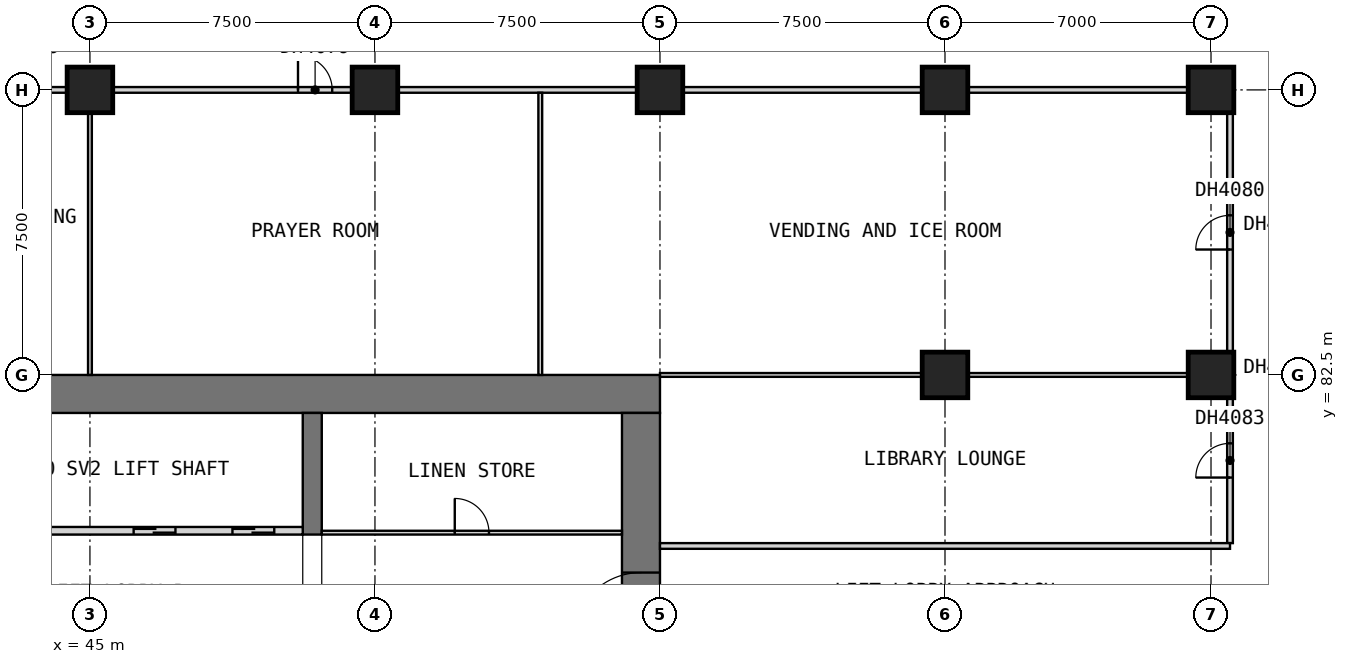
"""IFC4 building model, lengths in metres.
Left out: names, types, materials, properties, quantities, classifications, styles, units other than length and angle.
Written with IfcOpenShell. Run it as: python <this file> out.ifc"""

import sys

from ifc_helpers import new_model, si_unit, direction, frame, frame_2d, origin, origin_2d, place, context, subcontext, project, spatial, rectangle, extrude, element, fill, save


model = new_model("IFC4")
c1 = context("Model", 3, precision=1e-05, world=origin(), true_north=direction((0.0, 1.0)))
c2 = subcontext(c1, "Body", "Model", "MODEL_VIEW")
j1 = project(units=[si_unit("LENGTHUNIT", "METRE"), si_unit("PLANEANGLEUNIT", "RADIAN")], contexts=[c1])
p1 = place(None, origin())
s1 = spatial("IfcSite", under=j1, at=p1, CompositionType="ELEMENT")
p2 = place(p1, origin())
s2 = spatial("IfcBuilding", under=s1, at=p2, CompositionType="ELEMENT")
p3 = place(p2, frame((0.0, 0.0, 44.8)))
s3 = spatial("IfcBuildingStorey", under=s2, at=p3, CompositionType="ELEMENT", Elevation=44.8)
for number, where, z_axis, x_axis in (
    (1, (45.0, 90.0, 0.0), (0.0, 0.0, 1.0), (1.0, 0.0, 0.0)),
    (2, (52.5, 90.0, 0.0), (0.0, 0.0, 1.0), (1.0, 0.0, 0.0)),
    (3, (60.0, 90.0, 0.0), (0.0, 0.0, 1.0), (1.0, 0.0, 0.0)),
    (4, (67.5, 82.5, 0.0), (0.0, 0.0, 1.0), (1.0, 0.0, 0.0)),
    (5, (67.5, 90.0, 0.0), (0.0, 0.0, 1.0), (1.0, 0.0, 0.0)),
    (6, (74.5, 82.5, 0.0), (0.0, 0.0, 1.0), (1.0, 0.0, 0.0)),
    (7, (74.5, 90.0, 0.0), (0.0, 0.0, 1.0), (1.0, 0.0, 0.0)),
):
    element("IfcColumn", number, at=place(p3, frame(where, z_axis=z_axis, x_axis=x_axis)), inside=s3, PredefinedType="COLUMN", context=c2, shape_type="SweptSolid", body=[
        extrude(rectangle(XDim=1.2, YDim=1.2, at=origin_2d()), origin(), (0.0, 0.0, 1.0), 3.6),
    ])
p4 = place(p3, frame((30.0, 82.0, 0.0), z_axis=(0.0, 0.0, 1.0), x_axis=(1.0, 0.0, 0.0)))
e8 = element("IfcWall", 8, at=p4, inside=s3, PredefinedType="SHEAR", context=c2, shape_type="SweptSolid", body=[
    extrude(rectangle(XDim=30.0, YDim=1.0, at=frame_2d((15.0, 0.0))), origin(), (0.0, 0.0, 1.0), 3.6),
])
p5 = place(p3, frame((59.5, 61.0, 0.0), z_axis=(0.0, 0.0, 1.0), x_axis=(0.0, 1.0, 0.0)))
e9 = element("IfcWall", 9, at=p5, inside=s3, PredefinedType="SHEAR", context=c2, shape_type="SweptSolid", body=[
    extrude(rectangle(XDim=20.5, YDim=1.0, at=frame_2d((10.25, 0.0))), origin(), (0.0, 0.0, 1.0), 3.6),
])
p6 = place(p5, frame((14.5, 0.0, 0.0)))
e10 = element("IfcOpeningElement", 10, at=p6, cuts=e9, PredefinedType="OPENING", context=c2, shape_type="SweptSolid", body=[
    extrude(rectangle(XDim=1.8, YDim=2.1, at=frame_2d((0.9, 1.05))), frame((0.0, 0.51, 0.0), z_axis=(0.0, -1.0, 0.0), x_axis=(1.0, 0.0, 0.0)), (0.0, 0.0, 1.0), 1.02),
])
p7 = place(p3, frame((50.85, 78.3, 0.0), z_axis=(0.0, 0.0, 1.0), x_axis=(0.0, 1.0, 0.0)))
e11 = element("IfcWall", 11, at=p7, inside=s3, PredefinedType="SHEAR", context=c2, shape_type="SweptSolid", body=[
    extrude(rectangle(XDim=3.2, YDim=0.5, at=frame_2d((1.6, 0.0))), origin(), (0.0, 0.0, 1.0), 3.6),
])
p8 = place(p3, frame((35.0, 78.4, 0.0), z_axis=(0.0, 0.0, 1.0), x_axis=(1.0, 0.0, 0.0)))
e12 = element("IfcWall", 12, at=p8, inside=s3, PredefinedType="SOLIDWALL", context=c2, shape_type="SweptSolid", body=[
    extrude(rectangle(XDim=15.6, YDim=0.2, at=frame_2d((7.8, 0.0))), origin(), (0.0, 0.0, 1.0), 3.6),
])
p9 = place(p8, frame((0.75, 0.0, 0.0)))
e13 = element("IfcOpeningElement", 13, at=p9, cuts=e12, PredefinedType="OPENING", context=c2, shape_type="SweptSolid", body=[
    extrude(rectangle(XDim=1.1, YDim=2.1, at=frame_2d((0.55, 1.05))), frame((0.0, 0.11, 0.0), z_axis=(0.0, -1.0, 0.0), x_axis=(1.0, 0.0, 0.0)), (0.0, 0.0, 1.0), 0.22),
])
p10 = place(p8, frame((3.35, 0.0, 0.0)))
e14 = element("IfcOpeningElement", 14, at=p10, cuts=e12, PredefinedType="OPENING", context=c2, shape_type="SweptSolid", body=[
    extrude(rectangle(XDim=1.1, YDim=2.1, at=frame_2d((0.55, 1.05))), frame((0.0, 0.11, 0.0), z_axis=(0.0, -1.0, 0.0), x_axis=(1.0, 0.0, 0.0)), (0.0, 0.0, 1.0), 0.22),
])
p11 = place(p8, frame((11.15, 0.0, 0.0)))
e15 = element("IfcOpeningElement", 15, at=p11, cuts=e12, PredefinedType="OPENING", context=c2, shape_type="SweptSolid", body=[
    extrude(rectangle(XDim=1.1, YDim=2.1, at=frame_2d((0.55, 1.05))), frame((0.0, 0.11, 0.0), z_axis=(0.0, -1.0, 0.0), x_axis=(1.0, 0.0, 0.0)), (0.0, 0.0, 1.0), 0.22),
])
p12 = place(p8, frame((13.75, 0.0, 0.0)))
e16 = element("IfcOpeningElement", 16, at=p12, cuts=e12, PredefinedType="OPENING", context=c2, shape_type="SweptSolid", body=[
    extrude(rectangle(XDim=1.1, YDim=2.1, at=frame_2d((0.55, 1.05))), frame((0.0, 0.11, 0.0), z_axis=(0.0, -1.0, 0.0), x_axis=(1.0, 0.0, 0.0)), (0.0, 0.0, 1.0), 0.22),
])
p13 = place(p3, frame((51.1, 78.35, 0.0), z_axis=(0.0, 0.0, 1.0), x_axis=(1.0, 0.0, 0.0)))
e17 = element("IfcWall", 17, at=p13, inside=s3, PredefinedType="PARTITIONING", context=c2, shape_type="SweptSolid", body=[
    extrude(rectangle(XDim=7.9, YDim=0.1, at=frame_2d((3.95, 0.0))), origin(), (0.0, 0.0, 1.0), 3.35),
])
p14 = place(p13, frame((3.5, 0.0, 0.0)))
e18 = element("IfcOpeningElement", 18, at=p14, cuts=e17, PredefinedType="OPENING", context=c2, shape_type="SweptSolid", body=[
    extrude(rectangle(XDim=0.9, YDim=2.1, at=frame_2d((0.45, 1.05))), frame((0.0, 0.06, 0.0), z_axis=(0.0, -1.0, 0.0), x_axis=(1.0, 0.0, 0.0)), (0.0, 0.0, 1.0), 0.12),
])
p15 = place(p3, frame((33.75, 90.0, 0.0), z_axis=(0.0, 0.0, 1.0), x_axis=(1.0, 0.0, 0.0)))
e19 = element("IfcWall", 19, at=p15, inside=s3, PredefinedType="PARTITIONING", context=c2, shape_type="SweptSolid", body=[
    extrude(rectangle(XDim=41.25, YDim=0.15, at=frame_2d((20.625, 0.0))), origin(), (0.0, 0.0, 1.0), 3.35),
])
p16 = place(p15, frame((4.4, 0.0, 0.0)))
e20 = element("IfcOpeningElement", 20, at=p16, cuts=e19, PredefinedType="OPENING", context=c2, shape_type="SweptSolid", body=[
    extrude(rectangle(XDim=0.9, YDim=2.1, at=frame_2d((0.45, 1.05))), frame((0.0, 0.085, 0.0), z_axis=(0.0, -1.0, 0.0), x_axis=(1.0, 0.0, 0.0)), (0.0, 0.0, 1.0), 0.17),
])
p17 = place(p15, frame((9.075, 0.0, 0.0)))
e21 = element("IfcOpeningElement", 21, at=p17, cuts=e19, PredefinedType="OPENING", context=c2, shape_type="SweptSolid", body=[
    extrude(rectangle(XDim=0.9, YDim=2.1, at=frame_2d((0.45, 1.05))), frame((0.0, 0.085, 0.0), z_axis=(0.0, -1.0, 0.0), x_axis=(1.0, 0.0, 0.0)), (0.0, 0.0, 1.0), 0.17),
])
p18 = place(p15, frame((16.725, 0.0, 0.0)))
e22 = element("IfcOpeningElement", 22, at=p18, cuts=e19, PredefinedType="OPENING", context=c2, shape_type="SweptSolid", body=[
    extrude(rectangle(XDim=0.9, YDim=2.1, at=frame_2d((0.45, 1.05))), frame((0.0, 0.085, 0.0), z_axis=(0.0, -1.0, 0.0), x_axis=(1.0, 0.0, 0.0)), (0.0, 0.0, 1.0), 0.17),
])
p19 = place(p3, frame((75.0, 78.075, 0.0), z_axis=(0.0, 0.0, 1.0), x_axis=(0.0, 1.0, 0.0)))
e23 = element("IfcWall", 23, at=p19, inside=s3, PredefinedType="PARTITIONING", context=c2, shape_type="SweptSolid", body=[
    extrude(rectangle(XDim=11.85, YDim=0.15, at=frame_2d((5.925, 0.0))), origin(), (0.0, 0.0, 1.0), 3.35),
])
p20 = place(p19, frame((7.725, 0.0, 0.0)))
e24 = element("IfcOpeningElement", 24, at=p20, cuts=e23, PredefinedType="OPENING", context=c2, shape_type="SweptSolid", body=[
    extrude(rectangle(XDim=0.9, YDim=2.1, at=frame_2d((0.45, 1.05))), frame((0.0, 0.085, 0.0), z_axis=(0.0, -1.0, 0.0), x_axis=(1.0, 0.0, 0.0)), (0.0, 0.0, 1.0), 0.17),
])
p21 = place(p19, frame((1.725, 0.0, 0.0)))
e25 = element("IfcOpeningElement", 25, at=p21, cuts=e23, PredefinedType="OPENING", context=c2, shape_type="SweptSolid", body=[
    extrude(rectangle(XDim=0.9, YDim=2.1, at=frame_2d((0.45, 1.05))), frame((0.0, 0.085, 0.0), z_axis=(0.0, -1.0, 0.0), x_axis=(1.0, 0.0, 0.0)), (0.0, 0.0, 1.0), 0.17),
])
p22 = place(p3, frame((60.0, 82.5, 0.0), z_axis=(0.0, 0.0, 1.0), x_axis=(1.0, 0.0, 0.0)))
e26 = element("IfcWall", 26, at=p22, inside=s3, PredefinedType="PARTITIONING", context=c2, shape_type="SweptSolid", body=[
    extrude(rectangle(XDim=14.925, YDim=0.1, at=frame_2d((7.462, 0.0))), origin(), (0.0, 0.0, 1.0), 3.35),
])
for number, where, z_axis, x_axis in (
    (27, (45.0, 82.5, 0.0), (0.0, 0.0, 1.0), (0.0, 1.0, 0.0)),
    (28, (56.85, 82.5, 0.0), (0.0, 0.0, 1.0), (0.0, 1.0, 0.0)),
):
    element("IfcWall", number, at=place(p3, frame(where, z_axis=z_axis, x_axis=x_axis)), inside=s3, PredefinedType="PARTITIONING", context=c2, shape_type="SweptSolid", body=[
        extrude(rectangle(XDim=7.425, YDim=0.1, at=frame_2d((3.712, 0.0))), origin(), (0.0, 0.0, 1.0), 3.35),
    ])
p23 = place(p3, frame((60.0, 78.0, 0.0), z_axis=(0.0, 0.0, 1.0), x_axis=(1.0, 0.0, 0.0)))
e29 = element("IfcWall", 29, at=p23, inside=s3, PredefinedType="PARTITIONING", context=c2, shape_type="SweptSolid", body=[
    extrude(rectangle(XDim=15.0, YDim=0.15, at=frame_2d((7.5, 0.0))), origin(), (0.0, 0.0, 1.0), 3.35),
])
p24 = place(p11, origin())
e30 = element("IfcDoor", 30, at=p24, inside=s3, OperationType="DOUBLE_DOOR_SLIDING", PredefinedType="DOOR", context=c2, shape_type="SweptSolid", body=[
    extrude(rectangle(XDim=1.1, YDim=2.1, at=frame_2d((0.55, 1.05))), frame((0.0, 0.025, 0.0), z_axis=(0.0, -1.0, 0.0), x_axis=(1.0, 0.0, 0.0)), (0.0, 0.0, 1.0), 0.05),
])
fill(e15, e30)
p25 = place(p12, origin())
e31 = element("IfcDoor", 31, at=p25, inside=s3, OperationType="DOUBLE_DOOR_SLIDING", PredefinedType="DOOR", context=c2, shape_type="SweptSolid", body=[
    extrude(rectangle(XDim=1.1, YDim=2.1, at=frame_2d((0.55, 1.05))), frame((0.0, 0.025, 0.0), z_axis=(0.0, -1.0, 0.0), x_axis=(1.0, 0.0, 0.0)), (0.0, 0.0, 1.0), 0.05),
])
fill(e16, e31)
p26 = place(p6, origin())
e32 = element("IfcDoor", 32, at=p26, inside=s3, OperationType="DOUBLE_DOOR_SINGLE_SWING", PredefinedType="DOOR", context=c2, shape_type="SweptSolid", body=[
    extrude(rectangle(XDim=1.8, YDim=2.1, at=frame_2d((0.9, 1.05))), frame((0.0, 0.025, 0.0), z_axis=(0.0, -1.0, 0.0), x_axis=(1.0, 0.0, 0.0)), (0.0, 0.0, 1.0), 0.05),
])
fill(e10, e32)
p27 = place(p14, origin())
e33 = element("IfcDoor", 33, at=p27, inside=s3, OperationType="SINGLE_SWING_LEFT", PredefinedType="DOOR", context=c2, shape_type="SweptSolid", body=[
    extrude(rectangle(XDim=0.9, YDim=2.1, at=frame_2d((0.45, 1.05))), frame((0.0, 0.025, 0.0), z_axis=(0.0, -1.0, 0.0), x_axis=(1.0, 0.0, 0.0)), (0.0, 0.0, 1.0), 0.05),
])
fill(e18, e33)
p28 = place(p18, origin())
e34 = element("IfcDoor", 34, at=p28, inside=s3, OperationType="SINGLE_SWING_RIGHT", PredefinedType="DOOR", context=c2, shape_type="SweptSolid", body=[
    extrude(rectangle(XDim=0.9, YDim=2.1, at=frame_2d((0.45, 1.05))), frame((0.0, 0.025, 0.0), z_axis=(0.0, -1.0, 0.0), x_axis=(1.0, 0.0, 0.0)), (0.0, 0.0, 1.0), 0.05),
])
fill(e22, e34)
p29 = place(p20, origin())
e35 = element("IfcDoor", 35, at=p29, inside=s3, OperationType="SINGLE_SWING_LEFT", PredefinedType="DOOR", context=c2, shape_type="SweptSolid", body=[
    extrude(rectangle(XDim=0.9, YDim=2.1, at=frame_2d((0.45, 1.05))), frame((0.0, 0.025, 0.0), z_axis=(0.0, -1.0, 0.0), x_axis=(1.0, 0.0, 0.0)), (0.0, 0.0, 1.0), 0.05),
])
fill(e24, e35)
p30 = place(p21, origin())
e36 = element("IfcDoor", 36, at=p30, inside=s3, OperationType="SINGLE_SWING_LEFT", PredefinedType="DOOR", context=c2, shape_type="SweptSolid", body=[
    extrude(rectangle(XDim=0.9, YDim=2.1, at=frame_2d((0.45, 1.05))), frame((0.0, 0.025, 0.0), z_axis=(0.0, -1.0, 0.0), x_axis=(1.0, 0.0, 0.0)), (0.0, 0.0, 1.0), 0.05),
])
fill(e25, e36)
save(model, sys.argv[1])
